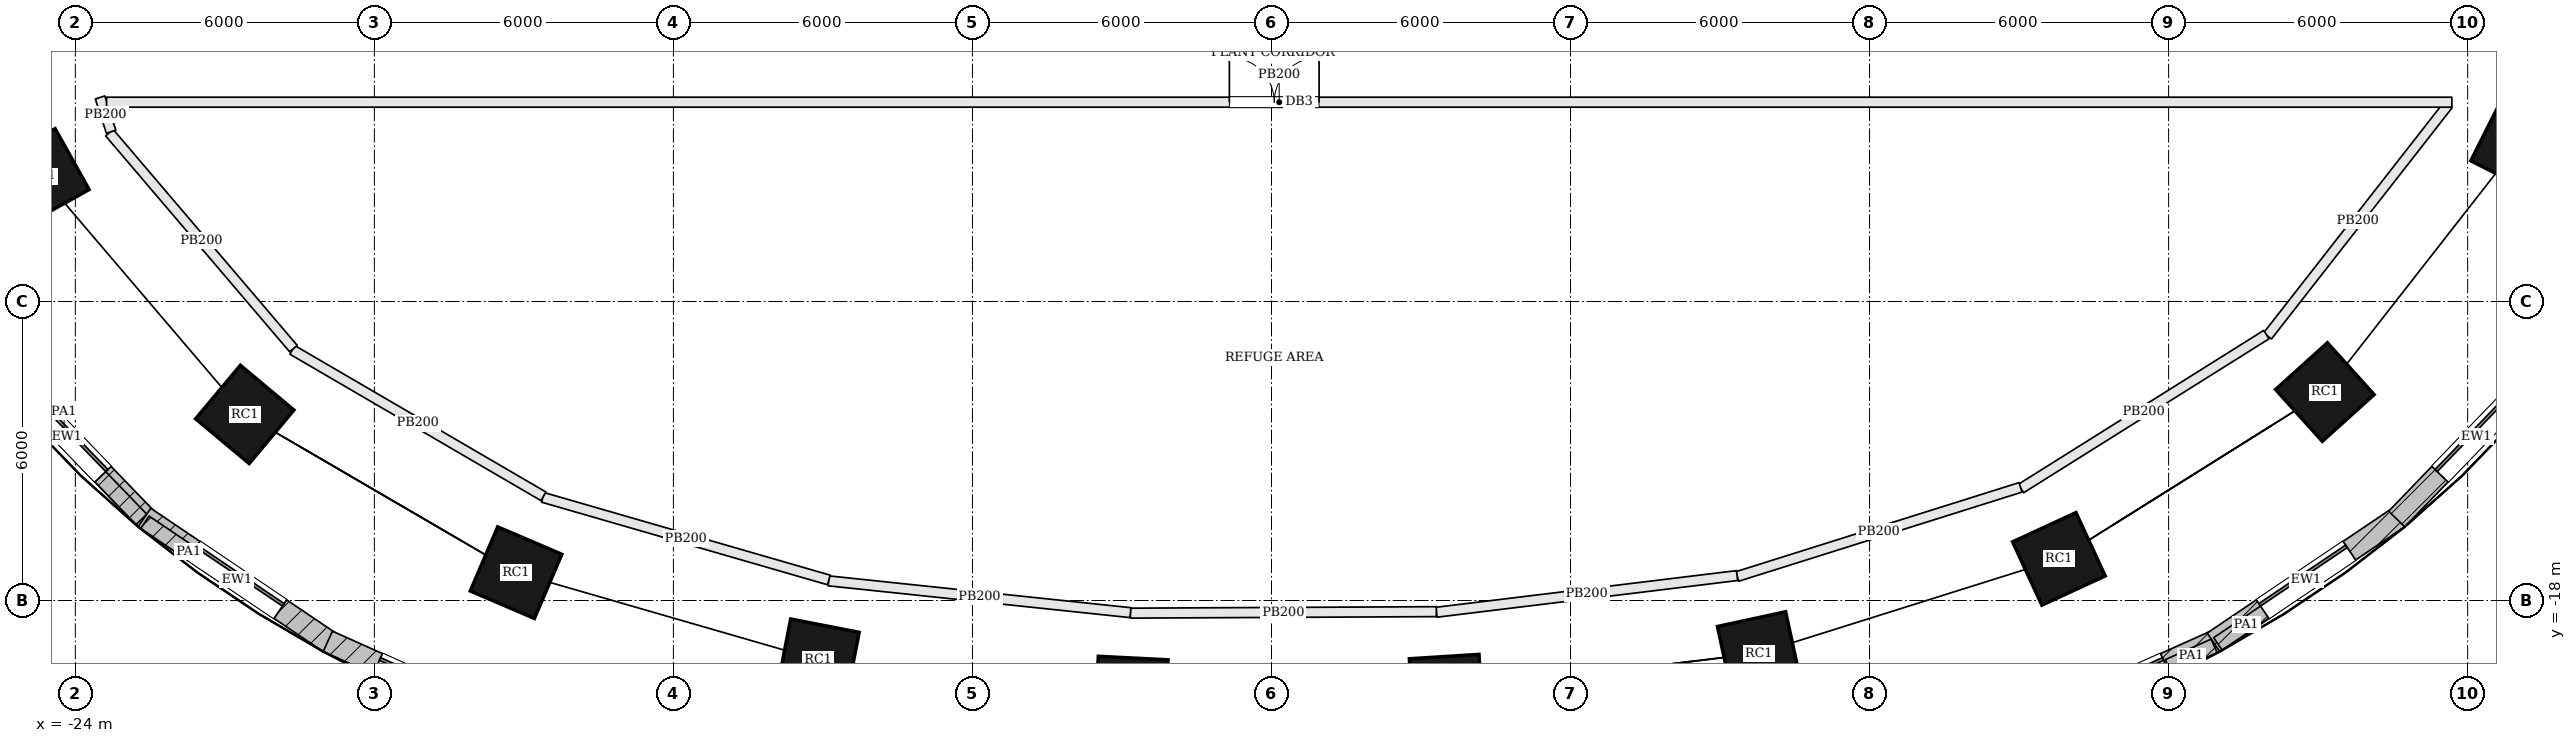
"""IFC4 building model, lengths in metres.
Left out: names, types, materials, properties, quantities, classifications, styles, units other than length and angle.
Written with IfcOpenShell. Run it as: python <this file> out.ifc"""

import sys

from ifc_helpers import new_model, si_unit, direction, frame, frame_2d, origin, origin_2d, place, context, subcontext, project, spatial, rectangle, extrude, element, fill, save


model = new_model("IFC4")
c1 = context("Model", 3, precision=1e-05, world=origin(), true_north=direction((0.0, 1.0)))
c2 = subcontext(c1, "Body", "Model", "MODEL_VIEW")
j1 = project(units=[si_unit("LENGTHUNIT", "METRE"), si_unit("PLANEANGLEUNIT", "RADIAN")], contexts=[c1])
p1 = place(None, origin())
s1 = spatial("IfcSite", under=j1, at=p1, CompositionType="ELEMENT")
p2 = place(p1, origin())
s2 = spatial("IfcBuilding", under=s1, at=p2, CompositionType="ELEMENT")
p3 = place(p2, frame((0.0, 0.0, 33.0)))
s3 = spatial("IfcBuildingStorey", under=s2, at=p3, CompositionType="ELEMENT", Elevation=33.0)
for number, where, z_axis, x_axis in (
    (1, (-24.676, -9.483, 0.0), (0.0, 0.0, 1.0), (0.487, -0.873, 0.0)),
    (2, (-20.6, -14.266, 0.0), (0.0, 0.0, 1.0), (0.767, -0.641, 0.0)),
    (3, (-15.157, -17.441, 0.0), (0.0, 0.0, 1.0), (0.919, -0.394, 0.0)),
    (4, (-9.094, -19.192, 0.0), (0.0, 0.0, 1.0), (0.981, -0.192, 0.0)),
    (5, (-2.811, -19.854, 0.0), (0.0, 0.0, 1.0), (0.999, -0.05, 0.0)),
    (6, (3.509, -19.824, 0.0), (0.0, 0.0, 1.0), (0.998, 0.063, 0.0)),
    (7, (9.78, -19.058, 0.0), (0.0, 0.0, 1.0), (0.977, 0.211, 0.0)),
    (8, (15.799, -17.165, 0.0), (0.0, 0.0, 1.0), (0.908, 0.419, 0.0)),
    (9, (21.135, -13.817, 0.0), (0.0, 0.0, 1.0), (0.743, 0.67, 0.0)),
    (10, (25.003, -8.866, 0.0), (0.0, 0.0, 1.0), (0.45, 0.893, 0.0)),
):
    element("IfcColumn", number, at=place(p3, frame(where, z_axis=z_axis, x_axis=x_axis)), inside=s3, PredefinedType="COLUMN", context=c2, shape_type="SweptSolid", body=[
        extrude(rectangle(XDim=1.4, YDim=1.4, at=origin_2d()), origin(), (0.0, 0.0, 1.0), 4.5),
    ])
p4 = place(p3, frame((-25.768, -13.056, 0.0), z_axis=(0.0, 0.0, 1.0), x_axis=(0.694191591241, -0.719790271294, 0.0)))
e11 = element("IfcWall", 11, at=p4, inside=s3, PredefinedType="SOLIDWALL", context=c2, shape_type="SweptSolid", body=[
    extrude(rectangle(XDim=4.597, YDim=0.45, at=frame_2d((2.298, 0.0))), origin(), (0.0, 0.0, 1.0), 4.3),
])
p5 = place(p4, frame((1.249, 0.0, 1.2)))
e12 = element("IfcOpeningElement", 12, at=p5, cuts=e11, PredefinedType="OPENING", context=c2, shape_type="SweptSolid", body=[
    extrude(rectangle(XDim=2.1, YDim=1.8, at=frame_2d((1.05, 0.9))), frame((0.0, 0.235, 0.0), z_axis=(0.0, -1.0, 0.0), x_axis=(1.0, 0.0, 0.0)), (0.0, 0.0, 1.0), 0.47),
])
p6 = place(p3, frame((-22.613, -16.334, 0.0), z_axis=(0.0, 0.0, 1.0), x_axis=(0.828976924359, -0.559282807604, 0.0)))
e13 = element("IfcWall", 13, at=p6, inside=s3, PredefinedType="SOLIDWALL", context=c2, shape_type="SweptSolid", body=[
    extrude(rectangle(XDim=4.479, YDim=0.45, at=frame_2d((2.24, 0.0))), origin(), (0.0, 0.0, 1.0), 4.3),
])
p7 = place(p6, frame((1.189, 0.0, 1.2)))
e14 = element("IfcOpeningElement", 14, at=p7, cuts=e13, PredefinedType="OPENING", context=c2, shape_type="SweptSolid", body=[
    extrude(rectangle(XDim=2.1, YDim=1.8, at=frame_2d((1.05, 0.9))), frame((0.0, 0.235, 0.0), z_axis=(0.0, -1.0, 0.0), x_axis=(1.0, 0.0, 0.0)), (0.0, 0.0, 1.0), 0.47),
])
p8 = place(p3, frame((-18.934, -18.821, 0.0), z_axis=(0.0, 0.0, 1.0), x_axis=(0.912571415594, -0.408917365052, 0.0)))
e15 = element("IfcWall", 15, at=p8, inside=s3, PredefinedType="SOLIDWALL", context=c2, shape_type="SweptSolid", body=[
    extrude(rectangle(XDim=4.301, YDim=0.45, at=frame_2d((2.15, 0.0))), origin(), (0.0, 0.0, 1.0), 4.3),
])
p9 = place(p8, frame((1.101, 0.0, 1.2)))
e16 = element("IfcOpeningElement", 16, at=p9, cuts=e15, PredefinedType="OPENING", context=c2, shape_type="SweptSolid", body=[
    extrude(rectangle(XDim=2.1, YDim=1.8, at=frame_2d((1.05, 0.9))), frame((0.0, 0.235, 0.0), z_axis=(0.0, -1.0, 0.0), x_axis=(1.0, 0.0, 0.0)), (0.0, 0.0, 1.0), 0.47),
])
p10 = place(p3, frame((15.009, -20.58, 0.0), z_axis=(0.0, 0.0, 1.0), x_axis=(0.912571415594, 0.408917365052, 0.0)))
e17 = element("IfcWall", 17, at=p10, inside=s3, PredefinedType="SOLIDWALL", context=c2, shape_type="SweptSolid", body=[
    extrude(rectangle(XDim=4.301, YDim=0.45, at=frame_2d((2.15, 0.0))), origin(), (0.0, 0.0, 1.0), 4.3),
])
p11 = place(p10, frame((1.101, 0.0, 1.2)))
e18 = element("IfcOpeningElement", 18, at=p11, cuts=e17, PredefinedType="OPENING", context=c2, shape_type="SweptSolid", body=[
    extrude(rectangle(XDim=2.1, YDim=1.8, at=frame_2d((1.05, 0.9))), frame((0.0, 0.235, 0.0), z_axis=(0.0, -1.0, 0.0), x_axis=(1.0, 0.0, 0.0)), (0.0, 0.0, 1.0), 0.47),
])
p12 = place(p3, frame((18.9, -18.84, 0.0), z_axis=(0.0, 0.0, 1.0), x_axis=(0.828976924359, 0.559282807604, 0.0)))
e19 = element("IfcWall", 19, at=p12, inside=s3, PredefinedType="SOLIDWALL", context=c2, shape_type="SweptSolid", body=[
    extrude(rectangle(XDim=4.479, YDim=0.45, at=frame_2d((2.24, 0.0))), origin(), (0.0, 0.0, 1.0), 4.3),
])
p13 = place(p12, frame((1.189, 0.0, 1.2)))
e20 = element("IfcOpeningElement", 20, at=p13, cuts=e19, PredefinedType="OPENING", context=c2, shape_type="SweptSolid", body=[
    extrude(rectangle(XDim=2.1, YDim=1.8, at=frame_2d((1.05, 0.9))), frame((0.0, 0.235, 0.0), z_axis=(0.0, -1.0, 0.0), x_axis=(1.0, 0.0, 0.0)), (0.0, 0.0, 1.0), 0.47),
])
p14 = place(p3, frame((22.577, -16.365, 0.0), z_axis=(0.0, 0.0, 1.0), x_axis=(0.694191591241, 0.719790271294, 0.0)))
e21 = element("IfcWall", 21, at=p14, inside=s3, PredefinedType="SOLIDWALL", context=c2, shape_type="SweptSolid", body=[
    extrude(rectangle(XDim=4.597, YDim=0.45, at=frame_2d((2.298, 0.0))), origin(), (0.0, 0.0, 1.0), 4.3),
])
p15 = place(p14, frame((1.249, 0.0, 1.2)))
e22 = element("IfcOpeningElement", 22, at=p15, cuts=e21, PredefinedType="OPENING", context=c2, shape_type="SweptSolid", body=[
    extrude(rectangle(XDim=2.1, YDim=1.8, at=frame_2d((1.05, 0.9))), frame((0.0, 0.235, 0.0), z_axis=(0.0, -1.0, 0.0), x_axis=(1.0, 0.0, 0.0)), (0.0, 0.0, 1.0), 0.47),
])
p16 = place(p3, frame((-25.776, -13.156, 4.5), z_axis=(0.0, 0.0, 1.0), x_axis=(0.694124449593, -0.719855019068, 0.0)))
e23 = element("IfcWall", 23, at=p16, inside=s3, PredefinedType="PARAPET", context=c2, shape_type="SweptSolid", body=[
    extrude(rectangle(XDim=4.469, YDim=0.3, at=frame_2d((2.234, 0.0))), origin(), (0.0, 0.0, 1.0), 1.1),
])
p17 = place(p3, frame((-22.604, -16.431, 4.5), z_axis=(0.0, 0.0, 1.0), x_axis=(0.828996540303, -0.559253731473, 0.0)))
e24 = element("IfcWall", 24, at=p17, inside=s3, PredefinedType="PARAPET", context=c2, shape_type="SweptSolid", body=[
    extrude(rectangle(XDim=2.124, YDim=0.3, at=frame_2d((1.062, 0.0))), origin(), (0.0, 0.0, 1.0), 1.1),
])
p18 = place(p3, frame((17.994, -19.324, 4.5), z_axis=(0.0, 0.0, 1.0), x_axis=(0.912568559093, 0.408923739779, 0.0)))
e25 = element("IfcWall", 25, at=p18, inside=s3, PredefinedType="PARAPET", context=c2, shape_type="SweptSolid", body=[
    extrude(rectangle(XDim=1.008, YDim=0.3, at=frame_2d((0.504, 0.0))), origin(), (0.0, 0.0, 1.0), 1.1),
])
p19 = place(p3, frame((18.989, -18.87, 4.5), z_axis=(0.0, 0.0, 1.0), x_axis=(0.828947562887, 0.55932632513, 0.0)))
e26 = element("IfcWall", 26, at=p19, inside=s3, PredefinedType="PARAPET", context=c2, shape_type="SweptSolid", body=[
    extrude(rectangle(XDim=1.374, YDim=0.3, at=frame_2d((0.687, 0.0))), origin(), (0.0, 0.0, 1.0), 1.1),
])
p20 = place(p3, frame((23.608, -8.053, 0.0), z_axis=(0.0, 0.0, 1.0), x_axis=(-0.615662559853, -0.78800990628, 0.0)))
e27 = element("IfcWall", 27, at=p20, inside=s3, PredefinedType="PARTITIONING", context=c2, shape_type="SweptSolid", body=[
    extrude(rectangle(XDim=5.884, YDim=0.2, at=frame_2d((2.942, 0.0))), origin(), (0.0, 0.0, 1.0), 4.3),
])
p21 = place(p3, frame((19.962, -12.664, 0.0), z_axis=(0.0, 0.0, 1.0), x_axis=(-0.847109868331, -0.531417793243, 0.0)))
e28 = element("IfcWall", 28, at=p21, inside=s3, PredefinedType="PARTITIONING", context=c2, shape_type="SweptSolid", body=[
    extrude(rectangle(XDim=5.812, YDim=0.2, at=frame_2d((2.906, 0.0))), origin(), (0.0, 0.0, 1.0), 4.3),
])
p22 = place(p3, frame((15.028, -15.73, 0.0), z_axis=(0.0, 0.0, 1.0), x_axis=(-0.953899230101, -0.300127071108, 0.0)))
e29 = element("IfcWall", 29, at=p22, inside=s3, PredefinedType="PARTITIONING", context=c2, shape_type="SweptSolid", body=[
    extrude(rectangle(XDim=5.958, YDim=0.2, at=frame_2d((2.979, 0.0))), origin(), (0.0, 0.0, 1.0), 4.3),
])
p23 = place(p3, frame((9.341, -17.5, 0.0), z_axis=(0.0, 0.0, 1.0), x_axis=(-0.992636454539, -0.121131618992, 0.0)))
e30 = element("IfcWall", 30, at=p23, inside=s3, PredefinedType="PARTITIONING", context=c2, shape_type="SweptSolid", body=[
    extrude(rectangle(XDim=6.077, YDim=0.2, at=frame_2d((3.038, 0.0))), origin(), (0.0, 0.0, 1.0), 4.3),
])
p24 = place(p3, frame((3.308, -18.224, 0.0), z_axis=(0.0, 0.0, 1.0), x_axis=(-0.999988230875, -0.004851609169, 0.0)))
e31 = element("IfcWall", 31, at=p24, inside=s3, PredefinedType="PARTITIONING", context=c2, shape_type="SweptSolid", body=[
    extrude(rectangle(XDim=6.139, YDim=0.2, at=frame_2d((3.07, 0.0))), origin(), (0.0, 0.0, 1.0), 4.3),
])
p25 = place(p3, frame((-2.83, -18.244, 0.0), z_axis=(0.0, 0.0, 1.0), x_axis=(-0.994495561058, 0.10477871461, 0.0)))
e32 = element("IfcWall", 32, at=p25, inside=s3, PredefinedType="PARTITIONING", context=c2, shape_type="SweptSolid", body=[
    extrude(rectangle(XDim=6.088, YDim=0.2, at=frame_2d((3.044, 0.0))), origin(), (0.0, 0.0, 1.0), 4.3),
])
p26 = place(p3, frame((-8.882, -17.588, 0.0), z_axis=(0.0, 0.0, 1.0), x_axis=(-0.960715878889, 0.277533781818, 0.0)))
e33 = element("IfcWall", 33, at=p26, inside=s3, PredefinedType="PARTITIONING", context=c2, shape_type="SweptSolid", body=[
    extrude(rectangle(XDim=5.97, YDim=0.2, at=frame_2d((2.985, 0.0))), origin(), (0.0, 0.0, 1.0), 4.3),
])
p27 = place(p3, frame((-14.608, -15.909, 0.0), z_axis=(0.0, 0.0, 1.0), x_axis=(-0.863803195861, 0.503829374709, 0.0)))
e34 = element("IfcWall", 34, at=p27, inside=s3, PredefinedType="PARTITIONING", context=c2, shape_type="SweptSolid", body=[
    extrude(rectangle(XDim=5.831, YDim=0.2, at=frame_2d((2.916, 0.0))), origin(), (0.0, 0.0, 1.0), 4.3),
])
p28 = place(p3, frame((-19.624, -12.945, 0.0), z_axis=(0.0, 0.0, 1.0), x_axis=(-0.648549295441, 0.761172655435, 0.0)))
e35 = element("IfcWall", 35, at=p28, inside=s3, PredefinedType="PARTITIONING", context=c2, shape_type="SweptSolid", body=[
    extrude(rectangle(XDim=5.693, YDim=0.2, at=frame_2d((2.846, 0.0))), origin(), (0.0, 0.0, 1.0), 4.3),
])
p29 = place(p3, frame((-23.282, -8.593, 0.0), z_axis=(0.0, 0.0, 1.0), x_axis=(-0.306992912324, 0.951711800801, 0.0)))
e36 = element("IfcWall", 36, at=p29, inside=s3, PredefinedType="PARTITIONING", context=c2, shape_type="SweptSolid", body=[
    extrude(rectangle(XDim=0.723, YDim=0.2, at=frame_2d((0.361, 0.0))), origin(), (0.0, 0.0, 1.0), 4.3),
])
p30 = place(p3, frame((-23.373, -8.0, 0.0), z_axis=(0.0, 0.0, 1.0), x_axis=(1.0, 0.0, 0.0)))
e37 = element("IfcWall", 37, at=p30, inside=s3, PredefinedType="PARTITIONING", context=c2, shape_type="SweptSolid", body=[
    extrude(rectangle(XDim=47.056, YDim=0.2, at=frame_2d((23.528, 0.0))), origin(), (0.0, 0.0, 1.0), 4.3),
])
p31 = place(p30, frame((22.528, 0.0, 0.0)))
e38 = element("IfcOpeningElement", 38, at=p31, cuts=e37, PredefinedType="OPENING", context=c2, shape_type="SweptSolid", body=[
    extrude(rectangle(XDim=1.8, YDim=2.1, at=frame_2d((0.9, 1.05))), frame((0.0, 0.11, 0.0), z_axis=(0.0, -1.0, 0.0), x_axis=(1.0, 0.0, 0.0)), (0.0, 0.0, 1.0), 0.22),
])
p32 = place(p5, origin())
e39 = element("IfcWindow", 39, at=p32, inside=s3, PartitioningType="SINGLE_PANEL", PredefinedType="WINDOW", context=c2, shape_type="SweptSolid", body=[
    extrude(rectangle(XDim=2.1, YDim=1.8, at=frame_2d((1.05, 0.9))), frame((0.0, 0.135, 0.0), z_axis=(0.0, -1.0, 0.0), x_axis=(1.0, 0.0, 0.0)), (0.0, 0.0, 1.0), 0.06),
])
fill(e12, e39)
p33 = place(p7, origin())
e40 = element("IfcWindow", 40, at=p33, inside=s3, PartitioningType="SINGLE_PANEL", PredefinedType="WINDOW", context=c2, shape_type="SweptSolid", body=[
    extrude(rectangle(XDim=2.1, YDim=1.8, at=frame_2d((1.05, 0.9))), frame((0.0, 0.135, 0.0), z_axis=(0.0, -1.0, 0.0), x_axis=(1.0, 0.0, 0.0)), (0.0, 0.0, 1.0), 0.06),
])
fill(e14, e40)
p34 = place(p9, origin())
e41 = element("IfcWindow", 41, at=p34, inside=s3, PartitioningType="SINGLE_PANEL", PredefinedType="WINDOW", context=c2, shape_type="SweptSolid", body=[
    extrude(rectangle(XDim=2.1, YDim=1.8, at=frame_2d((1.05, 0.9))), frame((0.0, 0.135, 0.0), z_axis=(0.0, -1.0, 0.0), x_axis=(1.0, 0.0, 0.0)), (0.0, 0.0, 1.0), 0.06),
])
fill(e16, e41)
p35 = place(p11, origin())
e42 = element("IfcWindow", 42, at=p35, inside=s3, PartitioningType="SINGLE_PANEL", PredefinedType="WINDOW", context=c2, shape_type="SweptSolid", body=[
    extrude(rectangle(XDim=2.1, YDim=1.8, at=frame_2d((1.05, 0.9))), frame((0.0, 0.135, 0.0), z_axis=(0.0, -1.0, 0.0), x_axis=(1.0, 0.0, 0.0)), (0.0, 0.0, 1.0), 0.06),
])
fill(e18, e42)
p36 = place(p13, origin())
e43 = element("IfcWindow", 43, at=p36, inside=s3, PartitioningType="SINGLE_PANEL", PredefinedType="WINDOW", context=c2, shape_type="SweptSolid", body=[
    extrude(rectangle(XDim=2.1, YDim=1.8, at=frame_2d((1.05, 0.9))), frame((0.0, 0.135, 0.0), z_axis=(0.0, -1.0, 0.0), x_axis=(1.0, 0.0, 0.0)), (0.0, 0.0, 1.0), 0.06),
])
fill(e20, e43)
p37 = place(p15, origin())
e44 = element("IfcWindow", 44, at=p37, inside=s3, PartitioningType="SINGLE_PANEL", PredefinedType="WINDOW", context=c2, shape_type="SweptSolid", body=[
    extrude(rectangle(XDim=2.1, YDim=1.8, at=frame_2d((1.05, 0.9))), frame((0.0, 0.135, 0.0), z_axis=(0.0, -1.0, 0.0), x_axis=(1.0, 0.0, 0.0)), (0.0, 0.0, 1.0), 0.06),
])
fill(e22, e44)
p38 = place(p31, origin())
e45 = element("IfcDoor", 45, at=p38, inside=s3, OperationType="DOUBLE_DOOR_SINGLE_SWING", PredefinedType="DOOR", context=c2, shape_type="SweptSolid", body=[
    extrude(rectangle(XDim=1.8, YDim=2.1, at=frame_2d((0.9, 1.05))), frame((0.0, 0.025, 0.0), z_axis=(0.0, -1.0, 0.0), x_axis=(1.0, 0.0, 0.0)), (0.0, 0.0, 1.0), 0.05),
])
fill(e38, e45)
save(model, sys.argv[1])
